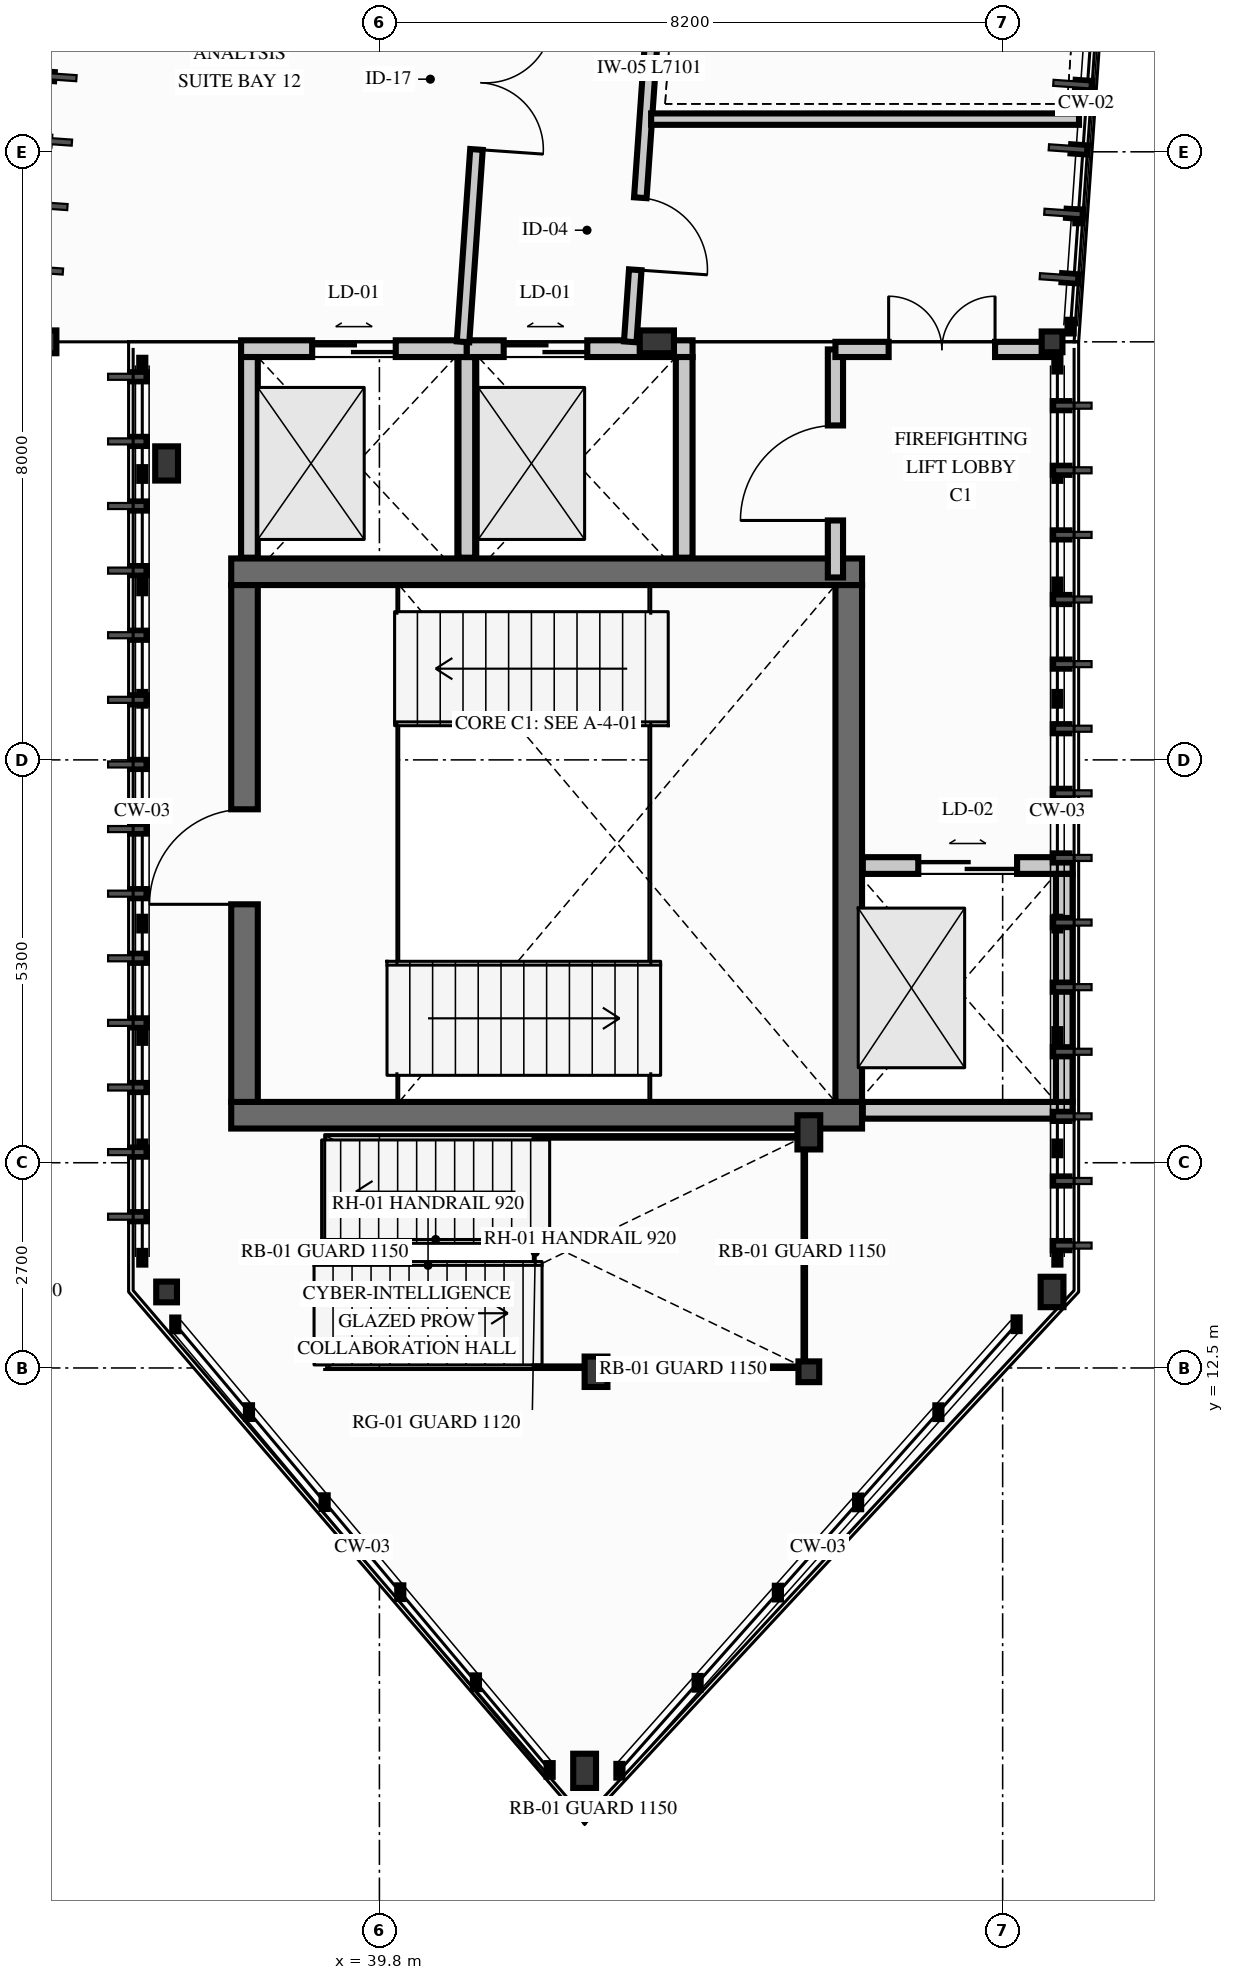
"""IFC4 building model, lengths in metres.
Left out: names, types, materials, properties, quantities, classifications, styles, units other than length and angle.
Written with IfcOpenShell. Run it as: python <this file> out.ifc"""

import sys

from ifc_helpers import new_model, si_unit, direction, frame, frame_2d, origin, origin_2d, place, context, subcontext, project, spatial, rectangle, hollow_circle, i_section, extrude, element, fill, save


model = new_model("IFC4")
c1 = context("Model", 3, precision=1e-05, world=origin(), true_north=direction((0.0, 1.0)))
c2 = subcontext(c1, "Body", "Model", "MODEL_VIEW")
j1 = project(units=[si_unit("LENGTHUNIT", "METRE"), si_unit("PLANEANGLEUNIT", "RADIAN")], contexts=[c1])
p1 = place(None, origin())
s1 = spatial("IfcSite", under=j1, at=p1, CompositionType="ELEMENT")
p2 = place(p1, origin())
s2 = spatial("IfcBuilding", under=s1, at=p2, CompositionType="ELEMENT")
p3 = place(p2, frame((0.0, 0.0, 13.5)))
s3 = spatial("IfcBuildingStorey", under=s2, at=p3, CompositionType="ELEMENT", Elevation=13.5)
for number, where, z_axis, x_axis in (
    (1, (37.85, 15.825, 0.0), (0.0, 0.0, 1.0), (1.0, 0.0, 0.0)),
    (2, (37.85, 22.975, 0.0), (0.0, 0.0, 1.0), (1.0, 0.0, 0.0)),
):
    element("IfcWall", number, at=place(p3, frame(where, z_axis=z_axis, x_axis=x_axis)), inside=s3, PredefinedType="SHEAR", context=c2, shape_type="SweptSolid", body=[
        extrude(rectangle(XDim=8.3, YDim=0.35, at=frame_2d((4.15, 0.0))), origin(), (0.0, 0.0, 1.0), 4.0),
    ])
p4 = place(p3, frame((38.025, 16.0, 0.0), z_axis=(0.0, 0.0, 1.0), x_axis=(0.0, 1.0, 0.0)))
e3 = element("IfcWall", 3, at=p4, inside=s3, PredefinedType="SHEAR", context=c2, shape_type="SweptSolid", body=[
    extrude(rectangle(XDim=6.8, YDim=0.35, at=frame_2d((3.4, 0.0))), origin(), (0.0, 0.0, 1.0), 4.0),
])
p5 = place(p4, frame((2.6, 0.0, 0.0)))
e4 = element("IfcOpeningElement", 4, at=p5, cuts=e3, PredefinedType="OPENING", context=c2, shape_type="SweptSolid", body=[
    extrude(rectangle(XDim=1.25, YDim=2.2, at=frame_2d((0.625, 1.1))), frame((0.0, 0.185, 0.0), z_axis=(0.0, -1.0, 0.0), x_axis=(1.0, 0.0, 0.0)), (0.0, 0.0, 1.0), 0.37),
])
p6 = place(p3, frame((45.975, 16.0, 0.0), z_axis=(0.0, 0.0, 1.0), x_axis=(0.0, 1.0, 0.0)))
e5 = element("IfcWall", 5, at=p6, inside=s3, PredefinedType="SHEAR", context=c2, shape_type="SweptSolid", body=[
    extrude(rectangle(XDim=6.8, YDim=0.35, at=frame_2d((3.4, 0.0))), origin(), (0.0, 0.0, 1.0), 4.0),
])
p7 = place(p3, frame((48.65, 26.0, 0.0), z_axis=(0.0, 0.0, 1.0), x_axis=(0.0, 1.0, 0.0)))
e6 = element("IfcColumn", 6, at=p7, inside=s3, PredefinedType="COLUMN", context=c2, shape_type="SweptSolid", body=[
    extrude(hollow_circle(Radius=0.136, WallThickness=0.012, at=origin_2d()), origin(), (0.0, 0.0, 1.0), 4.2),
])
p8 = place(p3, frame((43.45, 26.0, 0.0), z_axis=(0.0, 0.0, 1.0), x_axis=(0.0, 1.0, 0.0)))
e7 = element("IfcColumn", 7, at=p8, inside=s3, PredefinedType="COLUMN", context=c2, shape_type="SweptSolid", body=[
    extrude(i_section(OverallWidth=0.3, OverallDepth=0.45, WebThickness=0.014, FlangeThickness=0.026, FilletRadius=0.027, at=origin_2d()), origin(), (0.0, 0.0, 1.0), 4.2),
])
p9 = place(p3, frame((35.35, 26.0, 0.0), z_axis=(0.0, 0.0, 1.0), x_axis=(0.0, 1.0, 0.0)))
e8 = element("IfcColumn", 8, at=p9, inside=s3, PredefinedType="COLUMN", context=c2, shape_type="SweptSolid", body=[
    extrude(i_section(OverallWidth=0.3, OverallDepth=0.4, WebThickness=0.013, FlangeThickness=0.024, FilletRadius=0.027, at=origin_2d()), origin(), (0.0, 0.0, 1.0), 4.2),
])
p10 = place(p3, frame((37.0, 24.4, 0.0), z_axis=(0.0, 0.0, 1.0), x_axis=(1.0, 0.0, 0.0)))
e9 = element("IfcColumn", 9, at=p10, inside=s3, PredefinedType="COLUMN", context=c2, shape_type="SweptSolid", body=[
    extrude(i_section(OverallWidth=0.3, OverallDepth=0.45, WebThickness=0.014, FlangeThickness=0.026, FilletRadius=0.027, at=origin_2d()), origin(), (0.0, 0.0, 1.0), 4.2),
])
p11 = place(p3, frame((48.65, 13.5, 0.0), z_axis=(0.0, 0.0, 1.0), x_axis=(1.0, 0.0, 0.0)))
e10 = element("IfcColumn", 10, at=p11, inside=s3, PredefinedType="COLUMN", context=c2, shape_type="SweptSolid", body=[
    extrude(i_section(OverallWidth=0.3, OverallDepth=0.4, WebThickness=0.013, FlangeThickness=0.024, FilletRadius=0.027, at=origin_2d()), origin(), (0.0, 0.0, 1.0), 4.2),
])
p12 = place(p3, frame((37.0, 13.5, 0.0), z_axis=(0.0, 0.0, 1.0), x_axis=(1.0, 0.0, 0.0)))
e11 = element("IfcColumn", 11, at=p12, inside=s3, PredefinedType="COLUMN", context=c2, shape_type="SweptSolid", body=[
    extrude(hollow_circle(Radius=0.136, WallThickness=0.012, at=origin_2d()), origin(), (0.0, 0.0, 1.0), 4.2),
])
p13 = place(p3, frame((42.5, 7.2, 0.0), z_axis=(0.0, 0.0, 1.0), x_axis=(1.0, 0.0, 0.0)))
e12 = element("IfcColumn", 12, at=p13, inside=s3, PredefinedType="COLUMN", context=c2, shape_type="SweptSolid", body=[
    extrude(i_section(OverallWidth=0.3, OverallDepth=0.45, WebThickness=0.014, FlangeThickness=0.026, FilletRadius=0.027, at=origin_2d()), origin(), (0.0, 0.0, 1.0), 4.2),
])
p14 = place(p3, frame((42.65, 12.45, 0.0), z_axis=(0.0, 0.0, 1.0), x_axis=(1.0, 0.0, 0.0)))
e13 = element("IfcColumn", 13, at=p14, inside=s3, PredefinedType="COLUMN", context=c2, shape_type="SweptSolid", body=[
    extrude(i_section(OverallWidth=0.3, OverallDepth=0.4, WebThickness=0.013, FlangeThickness=0.024, FilletRadius=0.027, at=origin_2d()), origin(), (0.0, 0.0, 1.0), 4.2),
])
p15 = place(p3, frame((45.45, 12.45, 0.0), z_axis=(0.0, 0.0, 1.0), x_axis=(1.0, 0.0, 0.0)))
e14 = element("IfcColumn", 14, at=p15, inside=s3, PredefinedType="COLUMN", context=c2, shape_type="SweptSolid", body=[
    extrude(hollow_circle(Radius=0.136, WallThickness=0.012, at=origin_2d()), origin(), (0.0, 0.0, 1.0), 4.2),
])
p16 = place(p3, frame((45.45, 15.6, 0.0), z_axis=(0.0, 0.0, 1.0), x_axis=(1.0, 0.0, 0.0)))
e15 = element("IfcColumn", 15, at=p16, inside=s3, PredefinedType="COLUMN", context=c2, shape_type="SweptSolid", body=[
    extrude(i_section(OverallWidth=0.3, OverallDepth=0.45, WebThickness=0.014, FlangeThickness=0.026, FilletRadius=0.027, at=origin_2d()), origin(), (0.0, 0.0, 1.0), 4.2),
])
p17 = place(p3, frame((46.16, 15.89, 0.0), z_axis=(0.0, 0.0, 1.0), x_axis=(1.0, 0.0, 0.0)))
e16 = element("IfcWall", 16, at=p17, inside=s3, PredefinedType="PARTITIONING", context=c2, shape_type="SweptSolid", body=[
    extrude(rectangle(XDim=2.76, YDim=0.22, at=frame_2d((1.38, 0.0))), origin(), (0.0, 0.0, 1.0), 3.638),
])
p18 = place(p3, frame((46.16, 19.11, 0.0), z_axis=(0.0, 0.0, 1.0), x_axis=(1.0, 0.0, 0.0)))
e17 = element("IfcWall", 17, at=p18, inside=s3, PredefinedType="PARTITIONING", context=c2, shape_type="SweptSolid", body=[
    extrude(rectangle(XDim=2.76, YDim=0.22, at=frame_2d((1.38, 0.0))), origin(), (0.0, 0.0, 1.0), 3.638),
])
p19 = place(p18, frame((0.73, 0.0, 0.0)))
e18 = element("IfcOpeningElement", 18, at=p19, cuts=e17, PredefinedType="OPENING", context=c2, shape_type="SweptSolid", body=[
    extrude(rectangle(XDim=1.3, YDim=2.2, at=frame_2d((0.65, 1.1))), frame((0.0, 0.12, 0.0), z_axis=(0.0, -1.0, 0.0), x_axis=(1.0, 0.0, 0.0)), (0.0, 0.0, 1.0), 0.24),
])
p20 = place(p3, frame((48.81, 16.0, 0.0), z_axis=(0.0, 0.0, 1.0), x_axis=(0.0, 1.0, 0.0)))
e19 = element("IfcWall", 19, at=p20, inside=s3, PredefinedType="PARTITIONING", context=c2, shape_type="SweptSolid", body=[
    extrude(rectangle(XDim=3.0, YDim=0.22, at=frame_2d((1.5, 0.0))), origin(), (0.0, 0.0, 1.0), 3.64),
])
p21 = place(p3, frame((37.98, 25.91, 0.0), z_axis=(0.0, 0.0, 1.0), x_axis=(1.0, 0.0, 0.0)))
e20 = element("IfcWall", 20, at=p21, inside=s3, PredefinedType="PARTITIONING", context=c2, shape_type="SweptSolid", body=[
    extrude(rectangle(XDim=2.97, YDim=0.22, at=frame_2d((1.485, 0.0))), origin(), (0.0, 0.0, 1.0), 3.55),
])
p22 = place(p21, frame((0.935, 0.0, 0.0)))
e21 = element("IfcOpeningElement", 21, at=p22, cuts=e20, PredefinedType="OPENING", context=c2, shape_type="SweptSolid", body=[
    extrude(rectangle(XDim=1.1, YDim=2.15, at=frame_2d((0.55, 1.075))), frame((0.0, 0.12, 0.0), z_axis=(0.0, -1.0, 0.0), x_axis=(1.0, 0.0, 0.0)), (0.0, 0.0, 1.0), 0.24),
])
for number, where, z_axis, x_axis in (
    (22, (38.09, 23.16, 0.0), (0.0, 0.0, 1.0), (0.0, 1.0, 0.0)),
    (23, (40.95, 23.16, 0.0), (0.0, 0.0, 1.0), (0.0, 1.0, 0.0)),
):
    element("IfcWall", number, at=place(p3, frame(where, z_axis=z_axis, x_axis=x_axis)), inside=s3, PredefinedType="PARTITIONING", context=c2, shape_type="SweptSolid", body=[
        extrude(rectangle(XDim=2.64, YDim=0.22, at=frame_2d((1.32, 0.0))), origin(), (0.0, 0.0, 1.0), 3.98),
    ])
p23 = place(p3, frame((40.95, 25.91, 0.0), z_axis=(0.0, 0.0, 1.0), x_axis=(1.0, 0.0, 0.0)))
e24 = element("IfcWall", 24, at=p23, inside=s3, PredefinedType="PARTITIONING", context=c2, shape_type="SweptSolid", body=[
    extrude(rectangle(XDim=2.97, YDim=0.22, at=frame_2d((1.485, 0.0))), origin(), (0.0, 0.0, 1.0), 3.55),
])
p24 = place(p23, frame((0.485, 0.0, 0.0)))
e25 = element("IfcOpeningElement", 25, at=p24, cuts=e24, PredefinedType="OPENING", context=c2, shape_type="SweptSolid", body=[
    extrude(rectangle(XDim=1.1, YDim=2.15, at=frame_2d((0.55, 1.075))), frame((0.0, 0.12, 0.0), z_axis=(0.0, -1.0, 0.0), x_axis=(1.0, 0.0, 0.0)), (0.0, 0.0, 1.0), 0.24),
])
p25 = place(p3, frame((43.81, 23.16, 0.0), z_axis=(0.0, 0.0, 1.0), x_axis=(0.0, 1.0, 0.0)))
e26 = element("IfcWall", 26, at=p25, inside=s3, PredefinedType="PARTITIONING", context=c2, shape_type="SweptSolid", body=[
    extrude(rectangle(XDim=2.64, YDim=0.22, at=frame_2d((1.32, 0.0))), origin(), (0.0, 0.0, 1.0), 3.98),
])
p26 = place(p3, frame((45.8, 22.9, 0.0), z_axis=(0.0, 0.0, 1.0), x_axis=(0.0, 1.0, 0.0)))
e27 = element("IfcWall", 27, at=p26, inside=s3, PredefinedType="PARTITIONING", context=c2, shape_type="SweptSolid", body=[
    extrude(rectangle(XDim=3.0, YDim=0.2, at=frame_2d((1.5, 0.0))), origin(), (0.0, 0.0, 1.0), 3.98),
])
p27 = place(p26, frame((0.75, 0.0, 0.0)))
e28 = element("IfcOpeningElement", 28, at=p27, cuts=e27, PredefinedType="OPENING", context=c2, shape_type="SweptSolid", body=[
    extrude(rectangle(XDim=1.25, YDim=2.2, at=frame_2d((0.625, 1.1))), frame((0.0, 0.11, 0.0), z_axis=(0.0, -1.0, 0.0), x_axis=(1.0, 0.0, 0.0)), (0.0, 0.0, 1.0), 0.22),
])
p28 = place(p3, frame((45.8, 25.9, 0.0), z_axis=(0.0, 0.0, 1.0), x_axis=(1.0, 0.0, 0.0)))
e29 = element("IfcWall", 29, at=p28, inside=s3, PredefinedType="PARTITIONING", context=c2, shape_type="SweptSolid", body=[
    extrude(rectangle(XDim=2.85, YDim=0.2, at=frame_2d((1.425, 0.0))), origin(), (0.0, 0.0, 1.0), 3.6),
])
p29 = place(p28, frame((0.7, 0.0, 0.0)))
e30 = element("IfcOpeningElement", 30, at=p29, cuts=e29, PredefinedType="OPENING", context=c2, shape_type="SweptSolid", body=[
    extrude(rectangle(XDim=1.4, YDim=2.25, at=frame_2d((0.7, 1.125))), frame((0.0, 0.11, 0.0), z_axis=(0.0, -1.0, 0.0), x_axis=(1.0, 0.0, 0.0)), (0.0, 0.0, 1.0), 0.22),
])
p30 = place(p3, frame((43.595, 33.084, 0.0), z_axis=(0.0, 0.0, 1.0), x_axis=(-0.069756597752, -0.997564041588, 0.0)))
e31 = element("IfcWall", 31, at=p30, inside=s3, PredefinedType="PARTITIONING", context=c2, shape_type="SweptSolid", body=[
    extrude(rectangle(XDim=7.101, YDim=0.165, at=frame_2d((3.551, 0.0))), origin(), (0.0, 0.0, 1.0), 3.98),
])
p31 = place(p30, frame((5.201, 0.0, 0.0)))
e32 = element("IfcOpeningElement", 32, at=p31, cuts=e31, PredefinedType="OPENING", context=c2, shape_type="SweptSolid", body=[
    extrude(rectangle(XDim=0.95, YDim=2.15, at=frame_2d((0.475, 1.075))), frame((0.0, 0.093, 0.0), z_axis=(0.0, -1.0, 0.0), x_axis=(1.0, 0.0, 0.0)), (0.0, 0.0, 1.0), 0.185),
])
p32 = place(p30, frame((0.75, 0.0, 0.0)))
e33 = element("IfcOpeningElement", 33, at=p32, cuts=e31, PredefinedType="OPENING", context=c2, shape_type="SweptSolid", body=[
    extrude(rectangle(XDim=1.02, YDim=2.18, at=frame_2d((0.51, 1.09))), frame((0.0, 0.093, 0.0), z_axis=(0.0, -1.0, 0.0), x_axis=(1.0, 0.0, 0.0)), (0.0, 0.0, 1.0), 0.185),
])
p33 = place(p3, frame((41.417, 33.39, 0.0), z_axis=(0.0, 0.0, 1.0), x_axis=(-0.069766817412, -0.997563326906, 0.0)))
e34 = element("IfcWall", 34, at=p33, inside=s3, PredefinedType="PARTITIONING", context=c2, shape_type="SweptSolid", body=[
    extrude(rectangle(XDim=7.408, YDim=0.165, at=frame_2d((3.704, 0.0))), origin(), (0.0, 0.0, 1.0), 3.98),
])
p34 = place(p33, frame((3.111, 0.0, 0.0)))
e35 = element("IfcOpeningElement", 35, at=p34, cuts=e34, PredefinedType="OPENING", context=c2, shape_type="SweptSolid", body=[
    extrude(rectangle(XDim=1.76, YDim=2.36, at=frame_2d((0.88, 1.18))), frame((0.0, 0.093, 0.0), z_axis=(0.0, -1.0, 0.0), x_axis=(1.0, 0.0, 0.0)), (0.0, 0.0, 1.0), 0.185),
])
p35 = place(p3, frame((43.375, 28.93, 0.0), z_axis=(0.0, 0.0, 1.0), x_axis=(1.0, 0.0, 0.0)))
e36 = element("IfcWall", 36, at=p35, inside=s3, PredefinedType="PARTITIONING", context=c2, shape_type="SweptSolid", body=[
    extrude(rectangle(XDim=5.63, YDim=0.15, at=frame_2d((2.815, 0.0))), origin(), (0.0, 0.0, 1.0), 3.698),
])
p36 = place(p5, origin())
e37 = element("IfcDoor", 37, at=p36, inside=s3, OperationType="SINGLE_SWING_LEFT", PredefinedType="DOOR", context=c2, shape_type="SweptSolid", body=[
    extrude(rectangle(XDim=1.25, YDim=2.2, at=frame_2d((0.625, 1.1))), frame((0.0, 0.025, 0.0), z_axis=(0.0, -1.0, 0.0), x_axis=(1.0, 0.0, 0.0)), (0.0, 0.0, 1.0), 0.05),
])
fill(e4, e37)
p37 = place(p19, origin())
e38 = element("IfcDoor", 38, at=p37, inside=s3, OperationType="DOUBLE_DOOR_SLIDING", PredefinedType="DOOR", context=c2, shape_type="SweptSolid", body=[
    extrude(rectangle(XDim=1.3, YDim=2.2, at=frame_2d((0.65, 1.1))), frame((0.0, 0.025, 0.0), z_axis=(0.0, -1.0, 0.0), x_axis=(1.0, 0.0, 0.0)), (0.0, 0.0, 1.0), 0.05),
])
fill(e18, e38)
p38 = place(p22, origin())
e39 = element("IfcDoor", 39, at=p38, inside=s3, OperationType="DOUBLE_DOOR_SLIDING", PredefinedType="DOOR", context=c2, shape_type="SweptSolid", body=[
    extrude(rectangle(XDim=1.1, YDim=2.15, at=frame_2d((0.55, 1.075))), frame((0.0, 0.025, 0.0), z_axis=(0.0, -1.0, 0.0), x_axis=(1.0, 0.0, 0.0)), (0.0, 0.0, 1.0), 0.05),
])
fill(e21, e39)
p39 = place(p24, origin())
e40 = element("IfcDoor", 40, at=p39, inside=s3, OperationType="DOUBLE_DOOR_SLIDING", PredefinedType="DOOR", context=c2, shape_type="SweptSolid", body=[
    extrude(rectangle(XDim=1.1, YDim=2.15, at=frame_2d((0.55, 1.075))), frame((0.0, 0.025, 0.0), z_axis=(0.0, -1.0, 0.0), x_axis=(1.0, 0.0, 0.0)), (0.0, 0.0, 1.0), 0.05),
])
fill(e25, e40)
p40 = place(p29, origin())
e41 = element("IfcDoor", 41, at=p40, inside=s3, OperationType="DOUBLE_DOOR_SINGLE_SWING", PredefinedType="DOOR", context=c2, shape_type="SweptSolid", body=[
    extrude(rectangle(XDim=1.4, YDim=2.25, at=frame_2d((0.7, 1.125))), frame((0.0, 0.025, 0.0), z_axis=(0.0, -1.0, 0.0), x_axis=(1.0, 0.0, 0.0)), (0.0, 0.0, 1.0), 0.05),
])
fill(e30, e41)
p41 = place(p27, origin())
e42 = element("IfcDoor", 42, at=p41, inside=s3, OperationType="SINGLE_SWING_LEFT", PredefinedType="DOOR", context=c2, shape_type="SweptSolid", body=[
    extrude(rectangle(XDim=1.25, YDim=2.2, at=frame_2d((0.625, 1.1))), frame((0.0, 0.025, 0.0), z_axis=(0.0, -1.0, 0.0), x_axis=(1.0, 0.0, 0.0)), (0.0, 0.0, 1.0), 0.05),
])
fill(e28, e42)
p42 = place(p31, origin())
e43 = element("IfcDoor", 43, at=p42, inside=s3, OperationType="SINGLE_SWING_RIGHT", PredefinedType="DOOR", context=c2, shape_type="SweptSolid", body=[
    extrude(rectangle(XDim=0.95, YDim=2.15, at=frame_2d((0.475, 1.075))), frame((0.0, 0.025, 0.0), z_axis=(0.0, -1.0, 0.0), x_axis=(1.0, 0.0, 0.0)), (0.0, 0.0, 1.0), 0.05),
])
fill(e32, e43)
p43 = place(p34, origin())
e44 = element("IfcDoor", 44, at=p43, inside=s3, OperationType="DOUBLE_DOOR_SINGLE_SWING", PredefinedType="DOOR", context=c2, shape_type="SweptSolid", body=[
    extrude(rectangle(XDim=1.76, YDim=2.36, at=frame_2d((0.88, 1.18))), frame((0.0, 0.025, 0.0), z_axis=(0.0, -1.0, 0.0), x_axis=(1.0, 0.0, 0.0)), (0.0, 0.0, 1.0), 0.05),
])
fill(e35, e44)
save(model, sys.argv[1])
